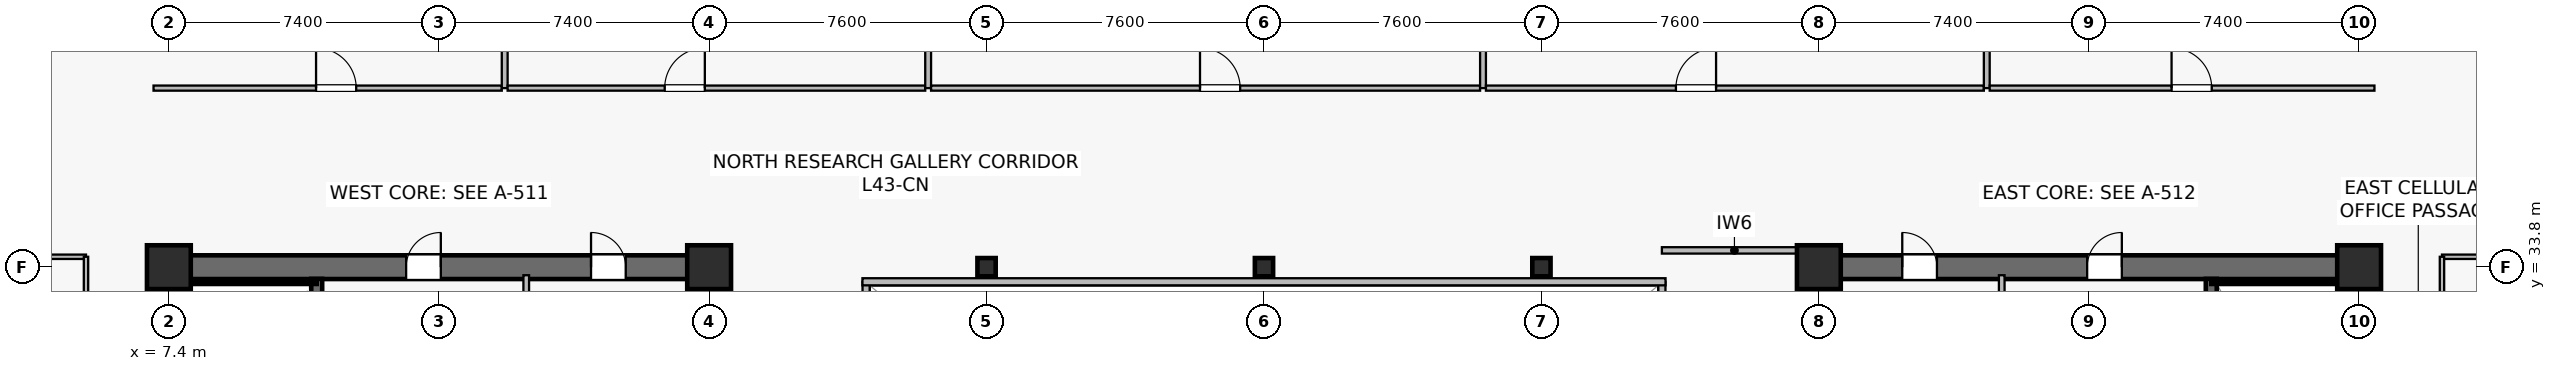
"""IFC4 building model, lengths in metres.
Left out: names, types, materials, properties, quantities, classifications, styles, units other than length and angle.
Written with IfcOpenShell. Run it as: python <this file> out.ifc"""

import sys

from ifc_helpers import new_model, si_unit, direction, frame, frame_2d, origin, origin_2d, place, context, subcontext, project, spatial, rectangle, hollow_rectangle, extrude, source, transform, mapped, element, fill, save


model = new_model("IFC4")
c1 = context("Model", 3, precision=1e-05, world=origin(), true_north=direction((0.0, 1.0)))
c2 = subcontext(c1, "Body", "Model", "MODEL_VIEW")
j1 = project(units=[si_unit("LENGTHUNIT", "METRE"), si_unit("PLANEANGLEUNIT", "RADIAN")], contexts=[c1])
p1 = place(None, origin())
s1 = spatial("IfcSite", under=j1, at=p1, CompositionType="ELEMENT")
p2 = place(p1, origin())
s2 = spatial("IfcBuilding", under=s1, at=p2, CompositionType="ELEMENT")
p3 = place(p2, frame((0.0, 0.0, 178.9)))
s3 = spatial("IfcBuildingStorey", under=s2, at=p3, CompositionType="ELEMENT", Elevation=178.9)
p4 = place(p3, frame((7.075, 33.8, 0.0), z_axis=(0.0, 0.0, 1.0), x_axis=(1.0, 0.0, 0.0)))
e1 = element("IfcWall", 1, at=p4, inside=s3, PredefinedType="SHEAR", context=c2, shape_type="SweptSolid", body=[
    extrude(rectangle(XDim=15.45, YDim=0.65, at=frame_2d((7.725, 0.0))), origin(), (0.0, 0.0, 1.0), 3.79),
])
p5 = place(p4, frame((6.825, 0.0, 0.0)))
e2 = element("IfcOpeningElement", 2, at=p5, cuts=e1, PredefinedType="OPENING", context=c2, shape_type="SweptSolid", body=[
    extrude(rectangle(XDim=0.95, YDim=2.15, at=frame_2d((0.475, 1.075))), frame((0.0, 0.335, 0.0), z_axis=(0.0, -1.0, 0.0), x_axis=(1.0, 0.0, 0.0)), (0.0, 0.0, 1.0), 0.67),
])
p6 = place(p4, frame((11.89, 0.0, 0.0)))
e3 = element("IfcOpeningElement", 3, at=p6, cuts=e1, PredefinedType="OPENING", context=c2, shape_type="SweptSolid", body=[
    extrude(rectangle(XDim=0.95, YDim=2.15, at=frame_2d((0.475, 1.075))), frame((0.0, 0.335, 0.0), z_axis=(0.0, -1.0, 0.0), x_axis=(1.0, 0.0, 0.0)), (0.0, 0.0, 1.0), 0.67),
])
p7 = place(p3, frame((7.4, 15.125, 0.0), z_axis=(0.0, 0.0, 1.0), x_axis=(0.0, 1.0, 0.0)))
e4 = element("IfcWall", 4, at=p7, inside=s3, PredefinedType="SHEAR", context=c2, shape_type="SweptSolid", body=[
    extrude(rectangle(XDim=18.35, YDim=0.65, at=frame_2d((9.175, 0.0))), origin(), (0.0, 0.0, 1.0), 3.79),
])
p8 = place(p3, frame((22.2, 15.125, 0.0), z_axis=(0.0, 0.0, 1.0), x_axis=(0.0, 1.0, 0.0)))
e5 = element("IfcWall", 5, at=p8, inside=s3, PredefinedType="SHEAR", context=c2, shape_type="SweptSolid", body=[
    extrude(rectangle(XDim=18.35, YDim=0.65, at=frame_2d((9.175, 0.0))), origin(), (0.0, 0.0, 1.0), 3.79),
])
p9 = place(p8, frame((3.425, 0.0, 0.0)))
e6 = element("IfcOpeningElement", 6, at=p9, cuts=e5, PredefinedType="OPENING", context=c2, shape_type="SweptSolid", body=[
    extrude(rectangle(XDim=1.42, YDim=2.2, at=frame_2d((0.71, 1.1))), frame((0.0, 0.335, 0.0), z_axis=(0.0, -1.0, 0.0), x_axis=(1.0, 0.0, 0.0)), (0.0, 0.0, 1.0), 0.67),
])
p10 = place(p3, frame((11.45, 24.85, 0.0), z_axis=(0.0, 0.0, 1.0), x_axis=(0.0, 1.0, 0.0)))
e7 = element("IfcWall", 7, at=p10, inside=s3, PredefinedType="SHEAR", context=c2, shape_type="SweptSolid", body=[
    extrude(rectangle(XDim=8.63, YDim=0.3, at=frame_2d((4.315, 0.0))), origin(), (0.0, 0.0, 1.0), 3.79),
])
p11 = place(p10, frame((0.42, 0.0, 0.0)))
e8 = element("IfcOpeningElement", 8, at=p11, cuts=e7, PredefinedType="OPENING", context=c2, shape_type="SweptSolid", body=[
    extrude(rectangle(XDim=1.1, YDim=2.15, at=frame_2d((0.55, 1.075))), frame((0.0, 0.16, 0.0), z_axis=(0.0, -1.0, 0.0), x_axis=(1.0, 0.0, 0.0)), (0.0, 0.0, 1.0), 0.32),
])
p12 = place(p3, frame((7.73, 33.4, 0.0), z_axis=(0.0, 0.0, 1.0), x_axis=(1.0, 0.0, 0.0)))
e9 = element("IfcWall", 9, at=p12, inside=s3, PredefinedType="SOLIDWALL", context=c2, shape_type="SweptSolid", body=[
    extrude(rectangle(XDim=3.72, YDim=0.12, at=frame_2d((1.86, 0.0))), origin(), (0.0, 0.0, 1.0), 3.79),
])
p13 = place(p3, frame((7.73, 25.0, 0.0), z_axis=(0.0, 0.0, 1.0), x_axis=(0.0, 1.0, 0.0)))
e10 = element("IfcWall", 10, at=p13, inside=s3, PredefinedType="SOLIDWALL", context=c2, shape_type="SweptSolid", body=[
    extrude(rectangle(XDim=8.32, YDim=0.12, at=frame_2d((4.16, 0.0))), origin(), (0.0, 0.0, 1.0), 3.79),
])
p14 = place(p3, frame((52.275, 33.8, 0.0), z_axis=(0.0, 0.0, 1.0), x_axis=(1.0, 0.0, 0.0)))
e11 = element("IfcWall", 11, at=p14, inside=s3, PredefinedType="SHEAR", context=c2, shape_type="SweptSolid", body=[
    extrude(rectangle(XDim=15.45, YDim=0.65, at=frame_2d((7.725, 0.0))), origin(), (0.0, 0.0, 1.0), 3.79),
])
p15 = place(p14, frame((7.675, 0.0, 0.0)))
e12 = element("IfcOpeningElement", 12, at=p15, cuts=e11, PredefinedType="OPENING", context=c2, shape_type="SweptSolid", body=[
    extrude(rectangle(XDim=0.95, YDim=2.15, at=frame_2d((0.475, 1.075))), frame((0.0, 0.335, 0.0), z_axis=(0.0, -1.0, 0.0), x_axis=(1.0, 0.0, 0.0)), (0.0, 0.0, 1.0), 0.67),
])
p16 = place(p14, frame((2.61, 0.0, 0.0)))
e13 = element("IfcOpeningElement", 13, at=p16, cuts=e11, PredefinedType="OPENING", context=c2, shape_type="SweptSolid", body=[
    extrude(rectangle(XDim=0.95, YDim=2.15, at=frame_2d((0.475, 1.075))), frame((0.0, 0.335, 0.0), z_axis=(0.0, -1.0, 0.0), x_axis=(1.0, 0.0, 0.0)), (0.0, 0.0, 1.0), 0.67),
])
p17 = place(p3, frame((52.6, 15.125, 0.0), z_axis=(0.0, 0.0, 1.0), x_axis=(0.0, 1.0, 0.0)))
e14 = element("IfcWall", 14, at=p17, inside=s3, PredefinedType="SHEAR", context=c2, shape_type="SweptSolid", body=[
    extrude(rectangle(XDim=18.35, YDim=0.65, at=frame_2d((9.175, 0.0))), origin(), (0.0, 0.0, 1.0), 3.79),
])
p18 = place(p17, frame((3.425, 0.0, 0.0)))
e15 = element("IfcOpeningElement", 15, at=p18, cuts=e14, PredefinedType="OPENING", context=c2, shape_type="SweptSolid", body=[
    extrude(rectangle(XDim=1.42, YDim=2.2, at=frame_2d((0.71, 1.1))), frame((0.0, 0.335, 0.0), z_axis=(0.0, -1.0, 0.0), x_axis=(1.0, 0.0, 0.0)), (0.0, 0.0, 1.0), 0.67),
])
p19 = place(p3, frame((67.4, 15.125, 0.0), z_axis=(0.0, 0.0, 1.0), x_axis=(0.0, 1.0, 0.0)))
e16 = element("IfcWall", 16, at=p19, inside=s3, PredefinedType="SHEAR", context=c2, shape_type="SweptSolid", body=[
    extrude(rectangle(XDim=18.35, YDim=0.65, at=frame_2d((9.175, 0.0))), origin(), (0.0, 0.0, 1.0), 3.79),
])
p20 = place(p3, frame((63.35, 24.85, 0.0), z_axis=(0.0, 0.0, 1.0), x_axis=(0.0, 1.0, 0.0)))
e17 = element("IfcWall", 17, at=p20, inside=s3, PredefinedType="SHEAR", context=c2, shape_type="SweptSolid", body=[
    extrude(rectangle(XDim=8.63, YDim=0.3, at=frame_2d((4.315, 0.0))), origin(), (0.0, 0.0, 1.0), 3.79),
])
p21 = place(p20, frame((0.42, 0.0, 0.0)))
e18 = element("IfcOpeningElement", 18, at=p21, cuts=e17, PredefinedType="OPENING", context=c2, shape_type="SweptSolid", body=[
    extrude(rectangle(XDim=1.1, YDim=2.15, at=frame_2d((0.55, 1.075))), frame((0.0, 0.16, 0.0), z_axis=(0.0, -1.0, 0.0), x_axis=(1.0, 0.0, 0.0)), (0.0, 0.0, 1.0), 0.32),
])
p22 = place(p3, frame((63.35, 33.4, 0.0), z_axis=(0.0, 0.0, 1.0), x_axis=(1.0, 0.0, 0.0)))
e19 = element("IfcWall", 19, at=p22, inside=s3, PredefinedType="SOLIDWALL", context=c2, shape_type="SweptSolid", body=[
    extrude(rectangle(XDim=3.72, YDim=0.12, at=frame_2d((1.86, 0.0))), origin(), (0.0, 0.0, 1.0), 3.79),
])
p23 = place(p3, frame((67.07, 25.0, 0.0), z_axis=(0.0, 0.0, 1.0), x_axis=(0.0, 1.0, 0.0)))
e20 = element("IfcWall", 20, at=p23, inside=s3, PredefinedType="SOLIDWALL", context=c2, shape_type="SweptSolid", body=[
    extrude(rectangle(XDim=8.32, YDim=0.12, at=frame_2d((4.16, 0.0))), origin(), (0.0, 0.0, 1.0), 3.79),
])
m1 = source(origin(), c2, "Body", "SweptSolid", [
    extrude(rectangle(XDim=1.2, YDim=1.2, at=origin_2d()), origin(), (0.0, 0.0, 1.0), 4.1),
])
for number, where, z_axis, x_axis in (
    (21, (7.4, 33.8, 0.0), (0.0, 0.0, 1.0), (1.0, 0.0, 0.0)),
    (22, (22.2, 33.8, 0.0), (0.0, 0.0, 1.0), (1.0, 0.0, 0.0)),
    (23, (52.6, 33.8, 0.0), (0.0, 0.0, 1.0), (1.0, 0.0, 0.0)),
    (24, (67.4, 33.8, 0.0), (0.0, 0.0, 1.0), (1.0, 0.0, 0.0)),
):
    element("IfcColumn", number, at=place(p3, frame(where, z_axis=z_axis, x_axis=x_axis)), inside=s3, PredefinedType="COLUMN", context=c2, shape_type="MappedRepresentation", body=[
        mapped(m1, transform((0.0, 0.0, 0.0), scale=1.0)),
    ])
m2 = source(origin(), c2, "Body", "SweptSolid", [
    extrude(hollow_rectangle(XDim=0.5, YDim=0.5, WallThickness=0.022, at=origin_2d()), origin(), (0.0, 0.0, 1.0), 4.1),
])
for number, where, z_axis, x_axis in (
    (25, (29.8, 33.8, 0.0), (0.0, 0.0, 1.0), (1.0, 0.0, 0.0)),
    (26, (37.4, 33.8, 0.0), (0.0, 0.0, 1.0), (1.0, 0.0, 0.0)),
    (27, (45.0, 33.8, 0.0), (0.0, 0.0, 1.0), (1.0, 0.0, 0.0)),
):
    element("IfcColumn", number, at=place(p3, frame(where, z_axis=z_axis, x_axis=x_axis)), inside=s3, PredefinedType="COLUMN", context=c2, shape_type="MappedRepresentation", body=[
        mapped(m2, transform((0.0, 0.0, 0.0), scale=1.0)),
    ])
for number, where, z_axis, x_axis in (
    (28, (17.19, 29.65, 0.0), (0.0, 0.0, 1.0), (0.0, 1.0, 0.0)),
    (29, (57.61, 29.65, 0.0), (0.0, 0.0, 1.0), (0.0, 1.0, 0.0)),
):
    element("IfcWall", number, at=place(p3, frame(where, z_axis=z_axis, x_axis=x_axis)), inside=s3, PredefinedType="PLUMBINGWALL", context=c2, shape_type="SweptSolid", body=[
        extrude(rectangle(XDim=3.93, YDim=0.155, at=frame_2d((1.965, 0.0))), origin(), (0.0, 0.0, 1.0), 3.79),
    ])
p24 = place(p3, frame((48.3, 34.26, 0.0), z_axis=(0.0, 0.0, 1.0), x_axis=(1.0, 0.0, 0.0)))
e30 = element("IfcWall", 30, at=p24, inside=s3, PredefinedType="PARTITIONING", context=c2, shape_type="SweptSolid", body=[
    extrude(rectangle(XDim=3.975, YDim=0.175, at=frame_2d((1.987, 0.0))), origin(), (0.0, 0.0, 1.0), 3.475),
])
p25 = place(p3, frame((26.5, 15.2, 0.0), z_axis=(0.0, 0.0, 1.0), x_axis=(0.0, 1.0, 0.0)))
e31 = element("IfcWall", 31, at=p25, inside=s3, PredefinedType="SOLIDWALL", context=c2, shape_type="SweptSolid", body=[
    extrude(rectangle(XDim=18.2, YDim=0.195, at=frame_2d((9.1, 0.0))), origin(), (0.0, 0.0, 1.0), 3.79),
])
p26 = place(p25, frame((1.8, 0.0, 0.9)))
e32 = element("IfcOpeningElement", 32, at=p26, cuts=e31, PredefinedType="OPENING", context=c2, shape_type="SweptSolid", body=[
    extrude(rectangle(XDim=1.2, YDim=1.35, at=frame_2d((0.6, 0.675))), frame((0.0, 0.107, 0.0), z_axis=(0.0, -1.0, 0.0), x_axis=(1.0, 0.0, 0.0)), (0.0, 0.0, 1.0), 0.215),
])
p27 = place(p25, frame((13.2, 0.0, 0.9)))
e33 = element("IfcOpeningElement", 33, at=p27, cuts=e31, PredefinedType="OPENING", context=c2, shape_type="SweptSolid", body=[
    extrude(rectangle(XDim=1.2, YDim=1.35, at=frame_2d((0.6, 0.675))), frame((0.0, 0.107, 0.0), z_axis=(0.0, -1.0, 0.0), x_axis=(1.0, 0.0, 0.0)), (0.0, 0.0, 1.0), 0.215),
])
p28 = place(p3, frame((48.3, 15.2, 0.0), z_axis=(0.0, 0.0, 1.0), x_axis=(0.0, 1.0, 0.0)))
e34 = element("IfcWall", 34, at=p28, inside=s3, PredefinedType="SOLIDWALL", context=c2, shape_type="SweptSolid", body=[
    extrude(rectangle(XDim=18.2, YDim=0.195, at=frame_2d((9.1, 0.0))), origin(), (0.0, 0.0, 1.0), 3.79),
])
p29 = place(p28, frame((1.8, 0.0, 0.9)))
e35 = element("IfcOpeningElement", 35, at=p29, cuts=e34, PredefinedType="OPENING", context=c2, shape_type="SweptSolid", body=[
    extrude(rectangle(XDim=1.2, YDim=1.35, at=frame_2d((0.6, 0.675))), frame((0.0, 0.107, 0.0), z_axis=(0.0, -1.0, 0.0), x_axis=(1.0, 0.0, 0.0)), (0.0, 0.0, 1.0), 0.215),
])
p30 = place(p28, frame((13.2, 0.0, 0.9)))
e36 = element("IfcOpeningElement", 36, at=p30, cuts=e34, PredefinedType="OPENING", context=c2, shape_type="SweptSolid", body=[
    extrude(rectangle(XDim=1.2, YDim=1.35, at=frame_2d((0.6, 0.675))), frame((0.0, 0.107, 0.0), z_axis=(0.0, -1.0, 0.0), x_axis=(1.0, 0.0, 0.0)), (0.0, 0.0, 1.0), 0.215),
])
p31 = place(p3, frame((26.4, 33.4, 0.0), z_axis=(0.0, 0.0, 1.0), x_axis=(1.0, 0.0, 0.0)))
e37 = element("IfcWall", 37, at=p31, inside=s3, PredefinedType="SOLIDWALL", context=c2, shape_type="SweptSolid", body=[
    extrude(rectangle(XDim=22.0, YDim=0.195, at=frame_2d((11.0, 0.0))), origin(), (0.0, 0.0, 1.0), 3.79),
])
p32 = place(p3, frame((6.98, 38.705, 0.0), z_axis=(0.0, 0.0, 1.0), x_axis=(1.0, 0.0, 0.0)))
e38 = element("IfcWall", 38, at=p32, inside=s3, PredefinedType="PARTITIONING", context=c2, shape_type="SweptSolid", body=[
    extrude(rectangle(XDim=9.54, YDim=0.14, at=frame_2d((4.77, 0.0))), origin(), (0.0, 0.0, 1.0), 3.187),
])
p33 = place(p32, frame((4.452, 0.0, 0.0)))
e39 = element("IfcOpeningElement", 39, at=p33, cuts=e38, PredefinedType="OPENING", context=c2, shape_type="SweptSolid", body=[
    extrude(rectangle(XDim=1.1, YDim=2.18, at=frame_2d((0.55, 1.09))), frame((0.0, 0.08, 0.0), z_axis=(0.0, -1.0, 0.0), x_axis=(1.0, 0.0, 0.0)), (0.0, 0.0, 1.0), 0.16),
])
p34 = place(p3, frame((16.6, 38.705, 0.0), z_axis=(0.0, 0.0, 1.0), x_axis=(0.0, 1.0, 0.0)))
e40 = element("IfcWall", 40, at=p34, inside=s3, PredefinedType="PARTITIONING", context=c2, shape_type="SweptSolid", body=[
    extrude(rectangle(XDim=8.485, YDim=0.16, at=frame_2d((4.242, 0.0))), origin(), (0.0, 0.0, 1.0), 3.075),
])
p35 = place(p3, frame((16.68, 38.705, 0.0), z_axis=(0.0, 0.0, 1.0), x_axis=(1.0, 0.0, 0.0)))
e41 = element("IfcWall", 41, at=p35, inside=s3, PredefinedType="PARTITIONING", context=c2, shape_type="SweptSolid", body=[
    extrude(rectangle(XDim=11.44, YDim=0.14, at=frame_2d((5.72, 0.0))), origin(), (0.0, 0.0, 1.0), 3.187),
])
p36 = place(p35, frame((4.302, 0.0, 0.0)))
e42 = element("IfcOpeningElement", 42, at=p36, cuts=e41, PredefinedType="OPENING", context=c2, shape_type="SweptSolid", body=[
    extrude(rectangle(XDim=1.1, YDim=2.18, at=frame_2d((0.55, 1.09))), frame((0.0, 0.08, 0.0), z_axis=(0.0, -1.0, 0.0), x_axis=(1.0, 0.0, 0.0)), (0.0, 0.0, 1.0), 0.16),
])
p37 = place(p3, frame((28.2, 38.705, 0.0), z_axis=(0.0, 0.0, 1.0), x_axis=(0.0, 1.0, 0.0)))
e43 = element("IfcWall", 43, at=p37, inside=s3, PredefinedType="PARTITIONING", context=c2, shape_type="SweptSolid", body=[
    extrude(rectangle(XDim=7.285, YDim=0.16, at=frame_2d((3.643, 0.0))), origin(), (0.0, 0.0, 1.0), 3.075),
])
p38 = place(p3, frame((28.28, 38.705, 0.0), z_axis=(0.0, 0.0, 1.0), x_axis=(1.0, 0.0, 0.0)))
e44 = element("IfcWall", 44, at=p38, inside=s3, PredefinedType="PARTITIONING", context=c2, shape_type="SweptSolid", body=[
    extrude(rectangle(XDim=15.04, YDim=0.14, at=frame_2d((7.52, 0.0))), origin(), (0.0, 0.0, 1.0), 3.187),
])
p39 = place(p38, frame((7.367, 0.0, 0.0)))
e45 = element("IfcOpeningElement", 45, at=p39, cuts=e44, PredefinedType="OPENING", context=c2, shape_type="SweptSolid", body=[
    extrude(rectangle(XDim=1.1, YDim=2.18, at=frame_2d((0.55, 1.09))), frame((0.0, 0.08, 0.0), z_axis=(0.0, -1.0, 0.0), x_axis=(1.0, 0.0, 0.0)), (0.0, 0.0, 1.0), 0.16),
])
p40 = place(p3, frame((43.4, 38.705, 0.0), z_axis=(0.0, 0.0, 1.0), x_axis=(0.0, 1.0, 0.0)))
e46 = element("IfcWall", 46, at=p40, inside=s3, PredefinedType="PARTITIONING", context=c2, shape_type="SweptSolid", body=[
    extrude(rectangle(XDim=7.285, YDim=0.16, at=frame_2d((3.643, 0.0))), origin(), (0.0, 0.0, 1.0), 3.075),
])
p41 = place(p3, frame((43.48, 38.705, 0.0), z_axis=(0.0, 0.0, 1.0), x_axis=(1.0, 0.0, 0.0)))
e47 = element("IfcWall", 47, at=p41, inside=s3, PredefinedType="PARTITIONING", context=c2, shape_type="SweptSolid", body=[
    extrude(rectangle(XDim=13.64, YDim=0.14, at=frame_2d((6.82, 0.0))), origin(), (0.0, 0.0, 1.0), 3.187),
])
p42 = place(p41, frame((5.204, 0.0, 0.0)))
e48 = element("IfcOpeningElement", 48, at=p42, cuts=e47, PredefinedType="OPENING", context=c2, shape_type="SweptSolid", body=[
    extrude(rectangle(XDim=1.1, YDim=2.18, at=frame_2d((0.55, 1.09))), frame((0.0, 0.08, 0.0), z_axis=(0.0, -1.0, 0.0), x_axis=(1.0, 0.0, 0.0)), (0.0, 0.0, 1.0), 0.16),
])
p43 = place(p3, frame((57.2, 38.705, 0.0), z_axis=(0.0, 0.0, 1.0), x_axis=(0.0, 1.0, 0.0)))
e49 = element("IfcWall", 49, at=p43, inside=s3, PredefinedType="PARTITIONING", context=c2, shape_type="SweptSolid", body=[
    extrude(rectangle(XDim=8.485, YDim=0.16, at=frame_2d((4.242, 0.0))), origin(), (0.0, 0.0, 1.0), 3.075),
])
p44 = place(p3, frame((57.28, 38.705, 0.0), z_axis=(0.0, 0.0, 1.0), x_axis=(1.0, 0.0, 0.0)))
e50 = element("IfcWall", 50, at=p44, inside=s3, PredefinedType="PARTITIONING", context=c2, shape_type="SweptSolid", body=[
    extrude(rectangle(XDim=10.54, YDim=0.14, at=frame_2d((5.27, 0.0))), origin(), (0.0, 0.0, 1.0), 3.187),
])
p45 = place(p44, frame((4.982, 0.0, 0.0)))
e51 = element("IfcOpeningElement", 51, at=p45, cuts=e50, PredefinedType="OPENING", context=c2, shape_type="SweptSolid", body=[
    extrude(rectangle(XDim=1.1, YDim=2.18, at=frame_2d((0.55, 1.09))), frame((0.0, 0.08, 0.0), z_axis=(0.0, -1.0, 0.0), x_axis=(1.0, 0.0, 0.0)), (0.0, 0.0, 1.0), 0.16),
])
p46 = place(p3, frame((2.11, 34.085, 0.0), z_axis=(0.0, 0.0, 1.0), x_axis=(1.0, 0.0, 0.0)))
e52 = element("IfcWall", 52, at=p46, inside=s3, PredefinedType="PARTITIONING", context=c2, shape_type="SweptSolid", body=[
    extrude(rectangle(XDim=3.02, YDim=0.12, at=frame_2d((1.51, 0.0))), origin(), (0.0, 0.0, 1.0), 3.79),
])
p47 = place(p3, frame((5.13, 26.06, 0.0), z_axis=(0.0, 0.0, 1.0), x_axis=(0.0, 1.0, 0.0)))
e53 = element("IfcWall", 53, at=p47, inside=s3, PredefinedType="PARTITIONING", context=c2, shape_type="SweptSolid", body=[
    extrude(rectangle(XDim=8.025, YDim=0.12, at=frame_2d((4.012, 0.0))), origin(), (0.0, 0.0, 1.0), 3.79),
])
p48 = place(p47, frame((3.562, 0.0, 0.0)))
e54 = element("IfcOpeningElement", 54, at=p48, cuts=e53, PredefinedType="OPENING", context=c2, shape_type="SweptSolid", body=[
    extrude(rectangle(XDim=0.9, YDim=2.1, at=frame_2d((0.45, 1.05))), frame((0.0, 0.07, 0.0), z_axis=(0.0, -1.0, 0.0), x_axis=(1.0, 0.0, 0.0)), (0.0, 0.0, 1.0), 0.14),
])
p49 = place(p3, frame((69.67, 34.085, 0.0), z_axis=(0.0, 0.0, 1.0), x_axis=(1.0, 0.0, 0.0)))
e55 = element("IfcWall", 55, at=p49, inside=s3, PredefinedType="PARTITIONING", context=c2, shape_type="SweptSolid", body=[
    extrude(rectangle(XDim=3.02, YDim=0.12, at=frame_2d((1.51, 0.0))), origin(), (0.0, 0.0, 1.0), 3.79),
])
p50 = place(p3, frame((69.67, 22.06, 0.0), z_axis=(0.0, 0.0, 1.0), x_axis=(0.0, 1.0, 0.0)))
e56 = element("IfcWall", 56, at=p50, inside=s3, PredefinedType="PARTITIONING", context=c2, shape_type="SweptSolid", body=[
    extrude(rectangle(XDim=12.025, YDim=0.12, at=frame_2d((6.012, 0.0))), origin(), (0.0, 0.0, 1.0), 3.79),
])
p51 = place(p50, frame((5.562, 0.0, 0.0)))
e57 = element("IfcOpeningElement", 57, at=p51, cuts=e56, PredefinedType="OPENING", context=c2, shape_type="SweptSolid", body=[
    extrude(rectangle(XDim=0.9, YDim=2.1, at=frame_2d((0.45, 1.05))), frame((0.0, 0.07, 0.0), z_axis=(0.0, -1.0, 0.0), x_axis=(1.0, 0.0, 0.0)), (0.0, 0.0, 1.0), 0.14),
])
m3 = source(origin(), c2, "Body", "SweptSolid", [
    extrude(rectangle(XDim=0.95, YDim=2.15, at=frame_2d((0.475, 1.075))), frame((0.0, 0.025, 0.0), z_axis=(0.0, -1.0, 0.0), x_axis=(1.0, 0.0, 0.0)), (0.0, 0.0, 1.0), 0.05),
])
p52 = place(p5, origin())
e58 = element("IfcDoor", 58, at=p52, inside=s3, OperationType="SINGLE_SWING_RIGHT", PredefinedType="DOOR", context=c2, shape_type="MappedRepresentation", body=[
    mapped(m3, transform((0.0, 0.0, 0.0), scale=1.0)),
])
fill(e2, e58)
p53 = place(p6, origin())
e59 = element("IfcDoor", 59, at=p53, inside=s3, OperationType="SINGLE_SWING_LEFT", PredefinedType="DOOR", context=c2, shape_type="MappedRepresentation", body=[
    mapped(m3, transform((0.0, 0.0, 0.0), scale=1.0)),
])
fill(e3, e59)
p54 = place(p15, origin())
e60 = element("IfcDoor", 60, at=p54, inside=s3, OperationType="SINGLE_SWING_RIGHT", PredefinedType="DOOR", context=c2, shape_type="MappedRepresentation", body=[
    mapped(m3, transform((0.0, 0.0, 0.0), scale=1.0)),
])
fill(e12, e60)
p55 = place(p16, origin())
e61 = element("IfcDoor", 61, at=p55, inside=s3, OperationType="SINGLE_SWING_LEFT", PredefinedType="DOOR", context=c2, shape_type="MappedRepresentation", body=[
    mapped(m3, transform((0.0, 0.0, 0.0), scale=1.0)),
])
fill(e13, e61)
m4 = source(origin(), c2, "Body", "SweptSolid", [
    extrude(rectangle(XDim=1.1, YDim=2.18, at=frame_2d((0.55, 1.09))), frame((0.0, 0.025, 0.0), z_axis=(0.0, -1.0, 0.0), x_axis=(1.0, 0.0, 0.0)), (0.0, 0.0, 1.0), 0.05),
])
p56 = place(p33, origin())
e62 = element("IfcDoor", 62, at=p56, inside=s3, OperationType="SINGLE_SWING_LEFT", PredefinedType="DOOR", context=c2, shape_type="MappedRepresentation", body=[
    mapped(m4, transform((0.0, 0.0, 0.0), scale=1.0)),
])
fill(e39, e62)
p57 = place(p36, origin())
e63 = element("IfcDoor", 63, at=p57, inside=s3, OperationType="SINGLE_SWING_RIGHT", PredefinedType="DOOR", context=c2, shape_type="MappedRepresentation", body=[
    mapped(m4, transform((0.0, 0.0, 0.0), scale=1.0)),
])
fill(e42, e63)
p58 = place(p39, origin())
e64 = element("IfcDoor", 64, at=p58, inside=s3, OperationType="SINGLE_SWING_LEFT", PredefinedType="DOOR", context=c2, shape_type="MappedRepresentation", body=[
    mapped(m4, transform((0.0, 0.0, 0.0), scale=1.0)),
])
fill(e45, e64)
p59 = place(p42, origin())
e65 = element("IfcDoor", 65, at=p59, inside=s3, OperationType="SINGLE_SWING_RIGHT", PredefinedType="DOOR", context=c2, shape_type="MappedRepresentation", body=[
    mapped(m4, transform((0.0, 0.0, 0.0), scale=1.0)),
])
fill(e48, e65)
p60 = place(p45, origin())
e66 = element("IfcDoor", 66, at=p60, inside=s3, OperationType="SINGLE_SWING_LEFT", PredefinedType="DOOR", context=c2, shape_type="MappedRepresentation", body=[
    mapped(m4, transform((0.0, 0.0, 0.0), scale=1.0)),
])
fill(e51, e66)
save(model, sys.argv[1])
